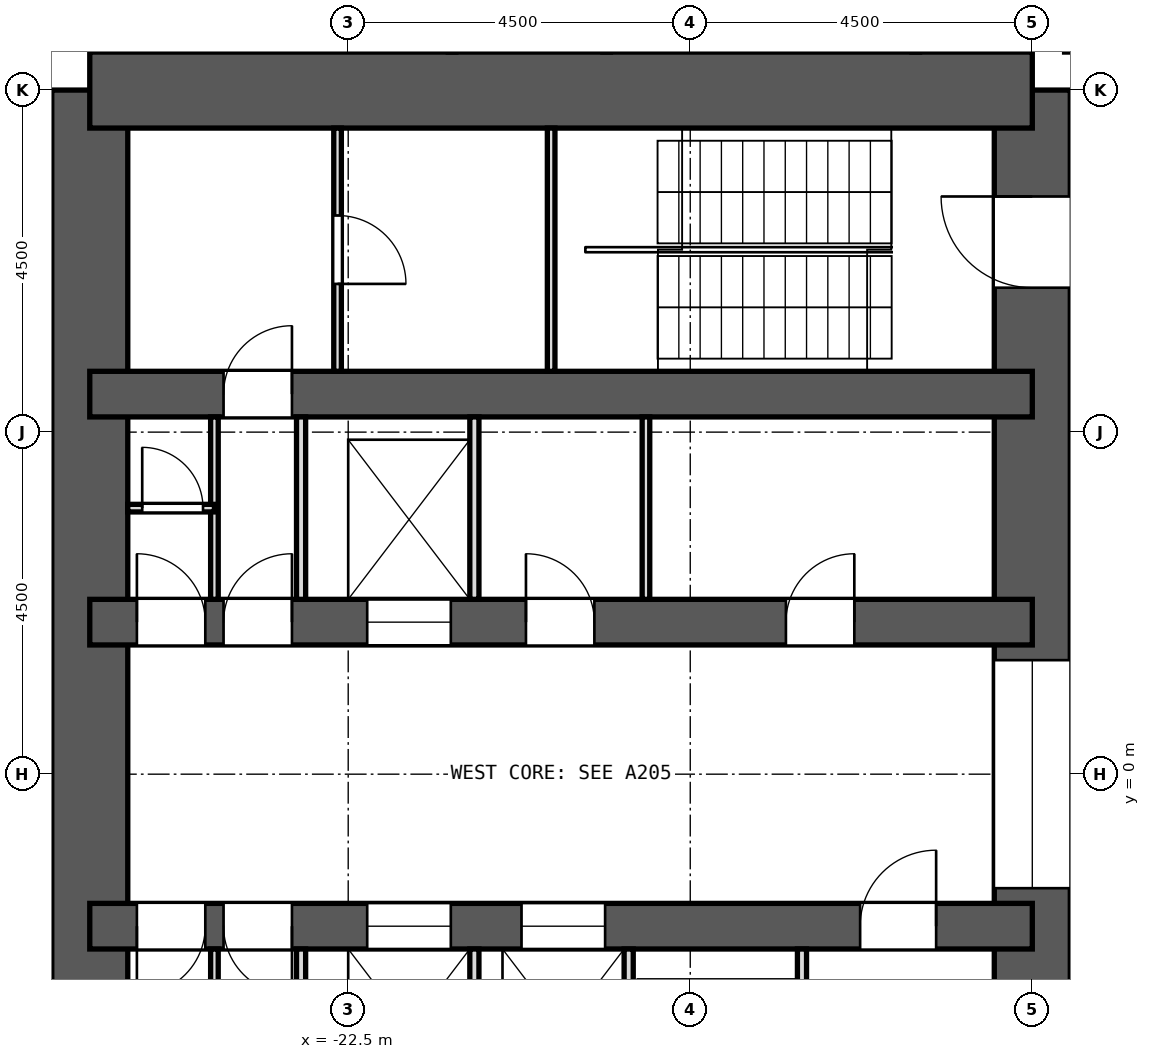
"""IFC4 building model, lengths in metres.
Left out: names, types, materials, properties, quantities, classifications, styles, units other than length and angle.
Written with IfcOpenShell. Run it as: python <this file> out.ifc"""

import sys

from ifc_helpers import new_model, si_unit, direction, frame, frame_2d, origin, place, context, subcontext, project, spatial, rectangle, extrude, element, fill, save


model = new_model("IFC4")
c1 = context("Model", 3, precision=1e-05, world=origin(), true_north=direction((0.0, 1.0)))
c2 = subcontext(c1, "Body", "Model", "MODEL_VIEW")
j1 = project(units=[si_unit("LENGTHUNIT", "METRE"), si_unit("PLANEANGLEUNIT", "RADIAN")], contexts=[c1])
p1 = place(None, origin())
s1 = spatial("IfcSite", under=j1, at=p1, CompositionType="ELEMENT")
p2 = place(p1, origin())
s2 = spatial("IfcBuilding", under=s1, at=p2, CompositionType="ELEMENT")
p3 = place(p2, frame((0.0, 0.0, 9.2)))
s3 = spatial("IfcBuildingStorey", under=s2, at=p3, CompositionType="ELEMENT", Elevation=9.2)
p4 = place(p3, frame((-13.5, -9.0, 0.0), z_axis=(0.0, 0.0, 1.0), x_axis=(0.0, 1.0, 0.0)))
e1 = element("IfcWall", 1, at=p4, inside=s3, PredefinedType="SHEAR", context=c2, shape_type="SweptSolid", body=[
    extrude(rectangle(XDim=18.0, YDim=1.0, at=frame_2d((9.0, 0.0))), origin(), (0.0, 0.0, 1.0), 4.2),
])
p5 = place(p4, frame((15.4, 0.0, 0.0)))
e2 = element("IfcOpeningElement", 2, at=p5, cuts=e1, PredefinedType="OPENING", context=c2, shape_type="SweptSolid", body=[
    extrude(rectangle(XDim=1.2, YDim=2.1, at=frame_2d((0.6, 1.05))), frame((0.0, 0.512, 0.0), z_axis=(0.0, -1.0, 0.0), x_axis=(1.0, 0.0, 0.0)), (0.0, 0.0, 1.0), 1.024),
])
p6 = place(p4, frame((1.4, 0.0, 0.0)))
e3 = element("IfcOpeningElement", 3, at=p6, cuts=e1, PredefinedType="OPENING", context=c2, shape_type="SweptSolid", body=[
    extrude(rectangle(XDim=1.2, YDim=2.1, at=frame_2d((0.6, 1.05))), frame((0.0, 0.512, 0.0), z_axis=(0.0, -1.0, 0.0), x_axis=(1.0, 0.0, 0.0)), (0.0, 0.0, 1.0), 1.024),
])
p7 = place(p4, frame((7.5, 0.0, 0.0)))
e4 = element("IfcOpeningElement", 4, at=p7, cuts=e1, PredefinedType="OPENING", context=c2, shape_type="SweptSolid", body=[
    extrude(rectangle(XDim=3.0, YDim=2.4, at=frame_2d((1.5, 1.2))), frame((0.0, 0.512, 0.0), z_axis=(0.0, -1.0, 0.0), x_axis=(1.0, 0.0, 0.0)), (0.0, 0.0, 1.0), 1.024),
])
p8 = place(p3, frame((-25.9, -9.0, 0.0), z_axis=(0.0, 0.0, 1.0), x_axis=(0.0, 1.0, 0.0)))
e5 = element("IfcWall", 5, at=p8, inside=s3, PredefinedType="SHEAR", context=c2, shape_type="SweptSolid", body=[
    extrude(rectangle(XDim=18.0, YDim=1.0, at=frame_2d((9.0, 0.0))), origin(), (0.0, 0.0, 1.0), 4.2),
])
p9 = place(p3, frame((-13.5, 9.0, 0.0), z_axis=(0.0, 0.0, 1.0), x_axis=(-1.0, 0.0, 0.0)))
e6 = element("IfcWall", 6, at=p9, inside=s3, PredefinedType="SHEAR", context=c2, shape_type="SweptSolid", body=[
    extrude(rectangle(XDim=12.4, YDim=1.0, at=frame_2d((6.2, 0.0))), origin(), (0.0, 0.0, 1.0), 4.2),
])
p10 = place(p3, frame((-13.5, 5.0, 0.0), z_axis=(0.0, 0.0, 1.0), x_axis=(-1.0, 0.0, 0.0)))
e7 = element("IfcWall", 7, at=p10, inside=s3, PredefinedType="SHEAR", context=c2, shape_type="SweptSolid", body=[
    extrude(rectangle(XDim=12.4, YDim=0.6, at=frame_2d((6.2, 0.0))), origin(), (0.0, 0.0, 1.0), 4.2),
])
p11 = place(p10, frame((9.74, 0.0, 0.0)))
e8 = element("IfcOpeningElement", 8, at=p11, cuts=e7, PredefinedType="OPENING", context=c2, shape_type="SweptSolid", body=[
    extrude(rectangle(XDim=0.9, YDim=2.1, at=frame_2d((0.45, 1.05))), frame((0.0, 0.312, 0.0), z_axis=(0.0, -1.0, 0.0), x_axis=(1.0, 0.0, 0.0)), (0.0, 0.0, 1.0), 0.624),
])
p12 = place(p3, frame((-13.5, 2.0, 0.0), z_axis=(0.0, 0.0, 1.0), x_axis=(-1.0, 0.0, 0.0)))
e9 = element("IfcWall", 9, at=p12, inside=s3, PredefinedType="SHEAR", context=c2, shape_type="SweptSolid", body=[
    extrude(rectangle(XDim=12.4, YDim=0.6, at=frame_2d((6.2, 0.0))), origin(), (0.0, 0.0, 1.0), 4.2),
])
p13 = place(p12, frame((7.65, 0.0, 0.0)))
e10 = element("IfcOpeningElement", 10, at=p13, cuts=e9, PredefinedType="OPENING", context=c2, shape_type="SweptSolid", body=[
    extrude(rectangle(XDim=1.1, YDim=2.1, at=frame_2d((0.55, 1.05))), frame((0.0, 0.312, 0.0), z_axis=(0.0, -1.0, 0.0), x_axis=(1.0, 0.0, 0.0)), (0.0, 0.0, 1.0), 0.624),
])
p14 = place(p12, frame((2.341, 0.0, 0.0)))
e11 = element("IfcOpeningElement", 11, at=p14, cuts=e9, PredefinedType="OPENING", context=c2, shape_type="SweptSolid", body=[
    extrude(rectangle(XDim=0.9, YDim=2.1, at=frame_2d((0.45, 1.05))), frame((0.0, 0.312, 0.0), z_axis=(0.0, -1.0, 0.0), x_axis=(1.0, 0.0, 0.0)), (0.0, 0.0, 1.0), 0.624),
])
p15 = place(p12, frame((5.761, 0.0, 0.0)))
e12 = element("IfcOpeningElement", 12, at=p15, cuts=e9, PredefinedType="OPENING", context=c2, shape_type="SweptSolid", body=[
    extrude(rectangle(XDim=0.9, YDim=2.1, at=frame_2d((0.45, 1.05))), frame((0.0, 0.312, 0.0), z_axis=(0.0, -1.0, 0.0), x_axis=(1.0, 0.0, 0.0)), (0.0, 0.0, 1.0), 0.624),
])
p16 = place(p12, frame((9.74, 0.0, 0.0)))
e13 = element("IfcOpeningElement", 13, at=p16, cuts=e9, PredefinedType="OPENING", context=c2, shape_type="SweptSolid", body=[
    extrude(rectangle(XDim=0.9, YDim=2.1, at=frame_2d((0.45, 1.05))), frame((0.0, 0.312, 0.0), z_axis=(0.0, -1.0, 0.0), x_axis=(1.0, 0.0, 0.0)), (0.0, 0.0, 1.0), 0.624),
])
p17 = place(p12, frame((10.88, 0.0, 0.0)))
e14 = element("IfcOpeningElement", 14, at=p17, cuts=e9, PredefinedType="OPENING", context=c2, shape_type="SweptSolid", body=[
    extrude(rectangle(XDim=0.9, YDim=2.1, at=frame_2d((0.45, 1.05))), frame((0.0, 0.312, 0.0), z_axis=(0.0, -1.0, 0.0), x_axis=(1.0, 0.0, 0.0)), (0.0, 0.0, 1.0), 0.624),
])
p18 = place(p3, frame((-13.5, -2.0, 0.0), z_axis=(0.0, 0.0, 1.0), x_axis=(-1.0, 0.0, 0.0)))
e15 = element("IfcWall", 15, at=p18, inside=s3, PredefinedType="SHEAR", context=c2, shape_type="SweptSolid", body=[
    extrude(rectangle(XDim=12.4, YDim=0.6, at=frame_2d((6.2, 0.0))), origin(), (0.0, 0.0, 1.0), 4.2),
])
p19 = place(p18, frame((5.62, 0.0, 0.0)))
e16 = element("IfcOpeningElement", 16, at=p19, cuts=e15, PredefinedType="OPENING", context=c2, shape_type="SweptSolid", body=[
    extrude(rectangle(XDim=1.1, YDim=2.1, at=frame_2d((0.55, 1.05))), frame((0.0, 0.312, 0.0), z_axis=(0.0, -1.0, 0.0), x_axis=(1.0, 0.0, 0.0)), (0.0, 0.0, 1.0), 0.624),
])
p20 = place(p18, frame((7.65, 0.0, 0.0)))
e17 = element("IfcOpeningElement", 17, at=p20, cuts=e15, PredefinedType="OPENING", context=c2, shape_type="SweptSolid", body=[
    extrude(rectangle(XDim=1.1, YDim=2.1, at=frame_2d((0.55, 1.05))), frame((0.0, 0.312, 0.0), z_axis=(0.0, -1.0, 0.0), x_axis=(1.0, 0.0, 0.0)), (0.0, 0.0, 1.0), 0.624),
])
p21 = place(p18, frame((1.265, 0.0, 0.0)))
e18 = element("IfcOpeningElement", 18, at=p21, cuts=e15, PredefinedType="OPENING", context=c2, shape_type="SweptSolid", body=[
    extrude(rectangle(XDim=1.0, YDim=2.1, at=frame_2d((0.5, 1.05))), frame((0.0, 0.312, 0.0), z_axis=(0.0, -1.0, 0.0), x_axis=(1.0, 0.0, 0.0)), (0.0, 0.0, 1.0), 0.624),
])
p22 = place(p18, frame((9.74, 0.0, 0.0)))
e19 = element("IfcOpeningElement", 19, at=p22, cuts=e15, PredefinedType="OPENING", context=c2, shape_type="SweptSolid", body=[
    extrude(rectangle(XDim=0.9, YDim=2.1, at=frame_2d((0.45, 1.05))), frame((0.0, 0.312, 0.0), z_axis=(0.0, -1.0, 0.0), x_axis=(1.0, 0.0, 0.0)), (0.0, 0.0, 1.0), 0.624),
])
p23 = place(p18, frame((10.88, 0.0, 0.0)))
e20 = element("IfcOpeningElement", 20, at=p23, cuts=e15, PredefinedType="OPENING", context=c2, shape_type="SweptSolid", body=[
    extrude(rectangle(XDim=0.9, YDim=2.1, at=frame_2d((0.45, 1.05))), frame((0.0, 0.312, 0.0), z_axis=(0.0, -1.0, 0.0), x_axis=(1.0, 0.0, 0.0)), (0.0, 0.0, 1.0), 0.624),
])
p24 = place(p3, frame((-26.328, 11.255, 0.0), z_axis=(0.0, 0.0, 1.0), x_axis=(-0.342034744565, -0.939687306241, 0.0)))
e21 = element("IfcWall", 21, at=p24, inside=s3, PredefinedType="SOLIDWALL", context=c2, shape_type="SweptSolid", body=[
    extrude(rectangle(XDim=4.099, YDim=0.6, at=frame_2d((2.05, 0.0))), origin(), (0.0, 0.0, 1.0), 3.65),
])
p25 = place(p3, frame((-13.0, 9.5, 0.0), z_axis=(0.0, 0.0, 1.0), x_axis=(0.0, 1.0, 0.0)))
e22 = element("IfcWall", 22, at=p25, inside=s3, PredefinedType="PARTITIONING", context=c2, shape_type="SweptSolid", body=[
    extrude(rectangle(XDim=4.425, YDim=0.15, at=frame_2d((2.212, 0.0))), origin(), (0.0, 0.0, 1.0), 3.65),
])
for number, where, z_axis, x_axis in (
    (23, (-15.033, 9.5, 0.0), (0.0, 0.0, 1.0), (0.0, 1.0, 0.0)),
    (24, (-19.1, 9.5, 0.0), (0.0, 0.0, 1.0), (0.0, 1.0, 0.0)),
    (25, (-21.133, 9.5, 0.0), (0.0, 0.0, 1.0), (0.0, 1.0, 0.0)),
):
    element("IfcWall", number, at=place(p3, frame(where, z_axis=z_axis, x_axis=x_axis)), inside=s3, PredefinedType="PARTITIONING", context=c2, shape_type="SweptSolid", body=[
        extrude(rectangle(XDim=4.425, YDim=0.1, at=frame_2d((2.212, 0.0))), origin(), (0.0, 0.0, 1.0), 3.65),
    ])
p26 = place(p3, frame((-18.583, 2.3, 0.0), z_axis=(0.0, 0.0, 1.0), x_axis=(0.0, 1.0, 0.0)))
e26 = element("IfcWall", 26, at=p26, inside=s3, PredefinedType="PARTITIONING", context=c2, shape_type="SweptSolid", body=[
    extrude(rectangle(XDim=2.4, YDim=0.1, at=frame_2d((1.2, 0.0))), origin(), (0.0, 0.0, 1.0), 3.65),
])
for number, where, z_axis, x_axis in (
    (27, (-20.84, 2.3, 0.0), (0.0, 0.0, 1.0), (0.0, 1.0, 0.0)),
    (28, (-23.12, 2.3, 0.0), (0.0, 0.0, 1.0), (0.0, 1.0, 0.0)),
):
    element("IfcWall", number, at=place(p3, frame(where, z_axis=z_axis, x_axis=x_axis)), inside=s3, PredefinedType="PARTITIONING", context=c2, shape_type="SweptSolid", body=[
        extrude(rectangle(XDim=2.4, YDim=0.12, at=frame_2d((1.2, 0.0))), origin(), (0.0, 0.0, 1.0), 3.65),
    ])
p27 = place(p3, frame((-24.26, 2.3, 0.0), z_axis=(0.0, 0.0, 1.0), x_axis=(0.0, 1.0, 0.0)))
e29 = element("IfcWall", 29, at=p27, inside=s3, PredefinedType="PARTITIONING", context=c2, shape_type="SweptSolid", body=[
    extrude(rectangle(XDim=2.4, YDim=0.1, at=frame_2d((1.2, 0.0))), origin(), (0.0, 0.0, 1.0), 3.65),
])
p28 = place(p3, frame((-16.53, -4.7, 0.0), z_axis=(0.0, 0.0, 1.0), x_axis=(0.0, 1.0, 0.0)))
e30 = element("IfcWall", 30, at=p28, inside=s3, PredefinedType="PARTITIONING", context=c2, shape_type="SweptSolid", body=[
    extrude(rectangle(XDim=2.4, YDim=0.12, at=frame_2d((1.2, 0.0))), origin(), (0.0, 0.0, 1.0), 3.65),
])
p29 = place(p28, frame((0.65, 0.0, 0.0)))
e31 = element("IfcOpeningElement", 31, at=p29, cuts=e30, PredefinedType="OPENING", context=c2, shape_type="SweptSolid", body=[
    extrude(rectangle(XDim=1.1, YDim=2.1, at=frame_2d((0.55, 1.05))), frame((0.0, 0.072, 0.0), z_axis=(0.0, -1.0, 0.0), x_axis=(1.0, 0.0, 0.0)), (0.0, 0.0, 1.0), 0.144),
])
for number, where, z_axis, x_axis in (
    (32, (-18.81, -4.7, 0.0), (0.0, 0.0, 1.0), (0.0, 1.0, 0.0)),
    (33, (-20.84, -4.7, 0.0), (0.0, 0.0, 1.0), (0.0, 1.0, 0.0)),
    (34, (-23.12, -4.7, 0.0), (0.0, 0.0, 1.0), (0.0, 1.0, 0.0)),
):
    element("IfcWall", number, at=place(p3, frame(where, z_axis=z_axis, x_axis=x_axis)), inside=s3, PredefinedType="PARTITIONING", context=c2, shape_type="SweptSolid", body=[
        extrude(rectangle(XDim=2.4, YDim=0.12, at=frame_2d((1.2, 0.0))), origin(), (0.0, 0.0, 1.0), 3.65),
    ])
p30 = place(p3, frame((-24.26, -4.7, 0.0), z_axis=(0.0, 0.0, 1.0), x_axis=(0.0, 1.0, 0.0)))
e35 = element("IfcWall", 35, at=p30, inside=s3, PredefinedType="PARTITIONING", context=c2, shape_type="SweptSolid", body=[
    extrude(rectangle(XDim=2.4, YDim=0.1, at=frame_2d((1.2, 0.0))), origin(), (0.0, 0.0, 1.0), 3.65),
])
p31 = place(p3, frame((-24.26, 3.5, 0.0), z_axis=(0.0, 0.0, 1.0), x_axis=(-1.0, 0.0, 0.0)))
e36 = element("IfcWall", 36, at=p31, inside=s3, PredefinedType="PARTITIONING", context=c2, shape_type="SweptSolid", body=[
    extrude(rectangle(XDim=1.14, YDim=0.1, at=frame_2d((0.57, 0.0))), origin(), (0.0, 0.0, 1.0), 3.65),
])
p32 = place(p31, frame((0.15, 0.0, 0.0)))
e37 = element("IfcOpeningElement", 37, at=p32, cuts=e36, PredefinedType="OPENING", context=c2, shape_type="SweptSolid", body=[
    extrude(rectangle(XDim=0.8, YDim=2.1, at=frame_2d((0.4, 1.05))), frame((0.0, 0.062, 0.0), z_axis=(0.0, -1.0, 0.0), x_axis=(1.0, 0.0, 0.0)), (0.0, 0.0, 1.0), 0.124),
])
p33 = place(p3, frame((-19.83, 5.3, 0.0), z_axis=(0.0, 0.0, 1.0), x_axis=(0.0, 1.0, 0.0)))
e38 = element("IfcWall", 38, at=p33, inside=s3, PredefinedType="PARTITIONING", context=c2, shape_type="SweptSolid", body=[
    extrude(rectangle(XDim=3.2, YDim=0.1, at=frame_2d((1.6, 0.0))), origin(), (0.0, 0.0, 1.0), 3.65),
])
p34 = place(p3, frame((-22.64, 5.3, 0.0), z_axis=(0.0, 0.0, 1.0), x_axis=(0.0, 1.0, 0.0)))
e39 = element("IfcWall", 39, at=p34, inside=s3, PredefinedType="PARTITIONING", context=c2, shape_type="SweptSolid", body=[
    extrude(rectangle(XDim=3.2, YDim=0.1, at=frame_2d((1.6, 0.0))), origin(), (0.0, 0.0, 1.0), 3.65),
])
p35 = place(p34, frame((1.15, 0.0, 0.0)))
e40 = element("IfcOpeningElement", 40, at=p35, cuts=e39, PredefinedType="OPENING", context=c2, shape_type="SweptSolid", body=[
    extrude(rectangle(XDim=0.9, YDim=2.1, at=frame_2d((0.45, 1.05))), frame((0.0, 0.062, 0.0), z_axis=(0.0, -1.0, 0.0), x_axis=(1.0, 0.0, 0.0)), (0.0, 0.0, 1.0), 0.124),
])
p36 = place(p13, origin())
e41 = element("IfcDoor", 41, at=p36, inside=s3, OperationType="DOUBLE_DOOR_SLIDING", PredefinedType="DOOR", context=c2, shape_type="SweptSolid", body=[
    extrude(rectangle(XDim=1.1, YDim=2.1, at=frame_2d((0.55, 1.05))), frame((0.0, 0.025, 0.0), z_axis=(0.0, -1.0, 0.0), x_axis=(1.0, 0.0, 0.0)), (0.0, 0.0, 1.0), 0.05),
])
fill(e10, e41)
p37 = place(p19, origin())
e42 = element("IfcDoor", 42, at=p37, inside=s3, OperationType="DOUBLE_DOOR_SLIDING", PredefinedType="DOOR", context=c2, shape_type="SweptSolid", body=[
    extrude(rectangle(XDim=1.1, YDim=2.1, at=frame_2d((0.55, 1.05))), frame((0.0, 0.025, 0.0), z_axis=(0.0, -1.0, 0.0), x_axis=(1.0, 0.0, 0.0)), (0.0, 0.0, 1.0), 0.05),
])
fill(e16, e42)
p38 = place(p20, origin())
e43 = element("IfcDoor", 43, at=p38, inside=s3, OperationType="DOUBLE_DOOR_SLIDING", PredefinedType="DOOR", context=c2, shape_type="SweptSolid", body=[
    extrude(rectangle(XDim=1.1, YDim=2.1, at=frame_2d((0.55, 1.05))), frame((0.0, 0.025, 0.0), z_axis=(0.0, -1.0, 0.0), x_axis=(1.0, 0.0, 0.0)), (0.0, 0.0, 1.0), 0.05),
])
fill(e17, e43)
p39 = place(p14, frame((0.9, 0.0, 0.0), z_axis=(0.0, 0.0, 1.0), x_axis=(-1.0, 0.0, 0.0)))
e44 = element("IfcDoor", 44, at=p39, inside=s3, OperationType="SINGLE_SWING_RIGHT", PredefinedType="DOOR", context=c2, shape_type="SweptSolid", body=[
    extrude(rectangle(XDim=0.9, YDim=2.1, at=frame_2d((0.45, 1.05))), frame((0.0, 0.025, 0.0), z_axis=(0.0, -1.0, 0.0), x_axis=(1.0, 0.0, 0.0)), (0.0, 0.0, 1.0), 0.05),
])
fill(e11, e44)
p40 = place(p15, frame((0.9, 0.0, 0.0), z_axis=(0.0, 0.0, 1.0), x_axis=(-1.0, 0.0, 0.0)))
e45 = element("IfcDoor", 45, at=p40, inside=s3, OperationType="SINGLE_SWING_LEFT", PredefinedType="DOOR", context=c2, shape_type="SweptSolid", body=[
    extrude(rectangle(XDim=0.9, YDim=2.1, at=frame_2d((0.45, 1.05))), frame((0.0, 0.025, 0.0), z_axis=(0.0, -1.0, 0.0), x_axis=(1.0, 0.0, 0.0)), (0.0, 0.0, 1.0), 0.05),
])
fill(e12, e45)
p41 = place(p16, frame((0.9, 0.0, 0.0), z_axis=(0.0, 0.0, 1.0), x_axis=(-1.0, 0.0, 0.0)))
e46 = element("IfcDoor", 46, at=p41, inside=s3, OperationType="SINGLE_SWING_RIGHT", PredefinedType="DOOR", context=c2, shape_type="SweptSolid", body=[
    extrude(rectangle(XDim=0.9, YDim=2.1, at=frame_2d((0.45, 1.05))), frame((0.0, 0.025, 0.0), z_axis=(0.0, -1.0, 0.0), x_axis=(1.0, 0.0, 0.0)), (0.0, 0.0, 1.0), 0.05),
])
fill(e13, e46)
p42 = place(p17, frame((0.9, 0.0, 0.0), z_axis=(0.0, 0.0, 1.0), x_axis=(-1.0, 0.0, 0.0)))
e47 = element("IfcDoor", 47, at=p42, inside=s3, OperationType="SINGLE_SWING_LEFT", PredefinedType="DOOR", context=c2, shape_type="SweptSolid", body=[
    extrude(rectangle(XDim=0.9, YDim=2.1, at=frame_2d((0.45, 1.05))), frame((0.0, 0.025, 0.0), z_axis=(0.0, -1.0, 0.0), x_axis=(1.0, 0.0, 0.0)), (0.0, 0.0, 1.0), 0.05),
])
fill(e14, e47)
p43 = place(p21, frame((1.0, 0.0, 0.0), z_axis=(0.0, 0.0, 1.0), x_axis=(-1.0, 0.0, 0.0)))
e48 = element("IfcDoor", 48, at=p43, inside=s3, OperationType="SINGLE_SWING_RIGHT", PredefinedType="DOOR", context=c2, shape_type="SweptSolid", body=[
    extrude(rectangle(XDim=1.0, YDim=2.1, at=frame_2d((0.5, 1.05))), frame((0.0, 0.025, 0.0), z_axis=(0.0, -1.0, 0.0), x_axis=(1.0, 0.0, 0.0)), (0.0, 0.0, 1.0), 0.05),
])
fill(e18, e48)
p44 = place(p22, origin())
e49 = element("IfcDoor", 49, at=p44, inside=s3, OperationType="SINGLE_SWING_LEFT", PredefinedType="DOOR", context=c2, shape_type="SweptSolid", body=[
    extrude(rectangle(XDim=0.9, YDim=2.1, at=frame_2d((0.45, 1.05))), frame((0.0, 0.025, 0.0), z_axis=(0.0, -1.0, 0.0), x_axis=(1.0, 0.0, 0.0)), (0.0, 0.0, 1.0), 0.05),
])
fill(e19, e49)
p45 = place(p23, origin())
e50 = element("IfcDoor", 50, at=p45, inside=s3, OperationType="SINGLE_SWING_RIGHT", PredefinedType="DOOR", context=c2, shape_type="SweptSolid", body=[
    extrude(rectangle(XDim=0.9, YDim=2.1, at=frame_2d((0.45, 1.05))), frame((0.0, 0.025, 0.0), z_axis=(0.0, -1.0, 0.0), x_axis=(1.0, 0.0, 0.0)), (0.0, 0.0, 1.0), 0.05),
])
fill(e20, e50)
p46 = place(p32, frame((0.8, 0.0, 0.0), z_axis=(0.0, 0.0, 1.0), x_axis=(-1.0, 0.0, 0.0)))
e51 = element("IfcDoor", 51, at=p46, inside=s3, OperationType="SINGLE_SWING_LEFT", PredefinedType="DOOR", context=c2, shape_type="SweptSolid", body=[
    extrude(rectangle(XDim=0.8, YDim=2.1, at=frame_2d((0.4, 1.05))), frame((0.0, 0.025, 0.0), z_axis=(0.0, -1.0, 0.0), x_axis=(1.0, 0.0, 0.0)), (0.0, 0.0, 1.0), 0.05),
])
fill(e37, e51)
p47 = place(p35, frame((0.9, 0.0, 0.0), z_axis=(0.0, 0.0, 1.0), x_axis=(-1.0, 0.0, 0.0)))
e52 = element("IfcDoor", 52, at=p47, inside=s3, OperationType="SINGLE_SWING_RIGHT", PredefinedType="DOOR", context=c2, shape_type="SweptSolid", body=[
    extrude(rectangle(XDim=0.9, YDim=2.1, at=frame_2d((0.45, 1.05))), frame((0.0, 0.025, 0.0), z_axis=(0.0, -1.0, 0.0), x_axis=(1.0, 0.0, 0.0)), (0.0, 0.0, 1.0), 0.05),
])
fill(e40, e52)
p48 = place(p11, frame((0.9, 0.0, 0.0), z_axis=(0.0, 0.0, 1.0), x_axis=(-1.0, 0.0, 0.0)))
e53 = element("IfcDoor", 53, at=p48, inside=s3, OperationType="SINGLE_SWING_RIGHT", PredefinedType="DOOR", context=c2, shape_type="SweptSolid", body=[
    extrude(rectangle(XDim=0.9, YDim=2.1, at=frame_2d((0.45, 1.05))), frame((0.0, 0.025, 0.0), z_axis=(0.0, -1.0, 0.0), x_axis=(1.0, 0.0, 0.0)), (0.0, 0.0, 1.0), 0.05),
])
fill(e8, e53)
p49 = place(p5, origin())
e54 = element("IfcDoor", 54, at=p49, inside=s3, OperationType="SINGLE_SWING_RIGHT", PredefinedType="DOOR", context=c2, shape_type="SweptSolid", body=[
    extrude(rectangle(XDim=1.2, YDim=2.1, at=frame_2d((0.6, 1.05))), frame((0.0, 0.025, 0.0), z_axis=(0.0, -1.0, 0.0), x_axis=(1.0, 0.0, 0.0)), (0.0, 0.0, 1.0), 0.05),
])
fill(e2, e54)
p50 = place(p7, origin())
e55 = element("IfcDoor", 55, at=p50, inside=s3, OperationType="DOUBLE_DOOR_SLIDING", PredefinedType="DOOR", context=c2, shape_type="SweptSolid", body=[
    extrude(rectangle(XDim=3.0, YDim=2.4, at=frame_2d((1.5, 1.2))), frame((0.0, 0.025, 0.0), z_axis=(0.0, -1.0, 0.0), x_axis=(1.0, 0.0, 0.0)), (0.0, 0.0, 1.0), 0.05),
])
fill(e4, e55)
save(model, sys.argv[1])
